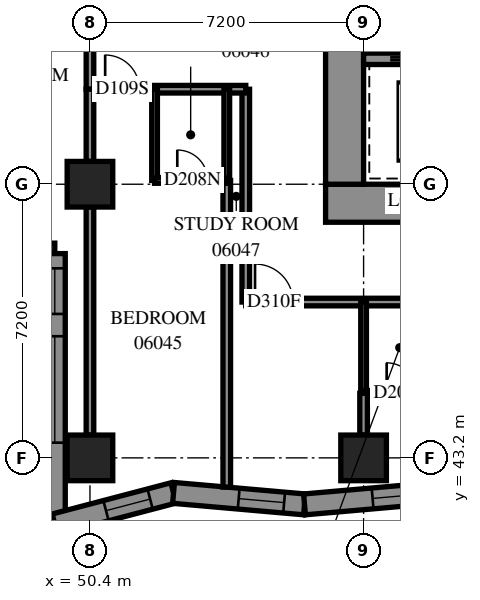
"""IFC4 building model, lengths in metres.
Left out: names, types, materials, properties, quantities, classifications, styles, units other than length and angle.
Written with IfcOpenShell. Run it as: python <this file> out.ifc"""

import sys

from ifc_helpers import new_model, si_unit, direction, frame, frame_2d, origin, origin_2d, place, context, subcontext, project, spatial, polyline, rectangle, outline, extrude, element, fill, save


model = new_model("IFC4")
c1 = context("Model", 3, precision=1e-05, world=origin(), true_north=direction((0.0, 1.0)))
c2 = subcontext(c1, "Body", "Model", "MODEL_VIEW")
j1 = project(units=[si_unit("LENGTHUNIT", "METRE"), si_unit("PLANEANGLEUNIT", "RADIAN")], contexts=[c1])
p1 = place(None, origin())
s1 = spatial("IfcSite", under=j1, at=p1, CompositionType="ELEMENT")
p2 = place(p1, origin())
s2 = spatial("IfcBuilding", under=s1, at=p2, CompositionType="ELEMENT")
p3 = place(p2, frame((0.0, 0.0, 27.0)))
s3 = spatial("IfcBuildingStorey", under=s2, at=p3, CompositionType="ELEMENT", Elevation=27.0)
for number, where, z_axis, x_axis in (
    (1, (50.4, 43.2, 0.0), (0.0, 0.0, 1.0), (1.0, 0.0, 0.0)),
    (2, (50.4, 50.4, 0.0), (0.0, 0.0, 1.0), (1.0, 0.0, 0.0)),
    (3, (57.6, 43.2, 0.0), (0.0, 0.0, 1.0), (1.0, 0.0, 0.0)),
):
    element("IfcColumn", number, at=place(p3, frame(where, z_axis=z_axis, x_axis=x_axis)), inside=s3, PredefinedType="COLUMN", context=c2, shape_type="SweptSolid", body=[
        extrude(rectangle(XDim=1.2, YDim=1.2, at=origin_2d()), origin(), (0.0, 0.0, 1.0), 3.1),
    ])
p4 = place(p3, frame((56.6, 49.9, -0.3), z_axis=(0.0, 0.0, 1.0), x_axis=(1.0, 0.0, 0.0)))
e4 = element("IfcWall", 4, at=p4, inside=s3, PredefinedType="SHEAR", context=c2, shape_type="SweptSolid", body=[
    extrude(rectangle(XDim=16.4, YDim=1.0, at=frame_2d((8.2, 0.0))), origin(), (0.0, 0.0, 1.0), 2.7),
])
p5 = place(p3, frame((57.1, 50.4, -0.3), z_axis=(0.0, 0.0, 1.0), x_axis=(0.0, 1.0, 0.0)))
e5 = element("IfcWall", 5, at=p5, inside=s3, PredefinedType="SHEAR", context=c2, shape_type="SweptSolid", body=[
    extrude(rectangle(XDim=14.4, YDim=1.0, at=frame_2d((7.2, 0.0))), origin(), (0.0, 0.0, 1.0), 2.7),
])
p6 = place(p5, frame((4.55, 0.0, 0.3)))
e6 = element("IfcOpeningElement", 6, at=p6, cuts=e5, PredefinedType="OPENING", context=c2, shape_type="SweptSolid", body=[
    extrude(rectangle(XDim=1.1, YDim=2.1, at=frame_2d((0.55, 1.05))), frame((0.0, 0.51, 0.0), z_axis=(0.0, -1.0, 0.0), x_axis=(1.0, 0.0, 0.0)), (0.0, 0.0, 1.0), 1.02),
])
p7 = place(p5, frame((11.35, 0.0, 0.3)))
e7 = element("IfcOpeningElement", 7, at=p7, cuts=e5, PredefinedType="OPENING", context=c2, shape_type="SweptSolid", body=[
    extrude(rectangle(XDim=1.1, YDim=2.1, at=frame_2d((0.55, 1.05))), frame((0.0, 0.51, 0.0), z_axis=(0.0, -1.0, 0.0), x_axis=(1.0, 0.0, 0.0)), (0.0, 0.0, 1.0), 1.02),
])
p8 = place(p3, frame((57.6, 53.7, 0.0), z_axis=(0.0, 0.0, 1.0), x_axis=(1.0, 0.0, 0.0)))
e8 = element("IfcWall", 8, at=p8, inside=s3, PredefinedType="SOLIDWALL", context=c2, shape_type="SweptSolid", body=[
    extrude(rectangle(XDim=14.4, YDim=0.3, at=frame_2d((7.2, 0.0))), origin(), (0.0, 0.0, 1.0), 3.1),
])
p9 = place(p8, frame((1.25, 0.0, 0.0)))
e9 = element("IfcOpeningElement", 9, at=p9, cuts=e8, PredefinedType="OPENING", context=c2, shape_type="SweptSolid", body=[
    extrude(rectangle(XDim=1.1, YDim=2.1, at=frame_2d((0.55, 1.05))), frame((0.0, 0.16, 0.0), z_axis=(0.0, -1.0, 0.0), x_axis=(1.0, 0.0, 0.0)), (0.0, 0.0, 1.0), 0.32),
])
p10 = place(p8, frame((4.85, 0.0, 0.0)))
e10 = element("IfcOpeningElement", 10, at=p10, cuts=e8, PredefinedType="OPENING", context=c2, shape_type="SweptSolid", body=[
    extrude(rectangle(XDim=1.1, YDim=2.1, at=frame_2d((0.55, 1.05))), frame((0.0, 0.16, 0.0), z_axis=(0.0, -1.0, 0.0), x_axis=(1.0, 0.0, 0.0)), (0.0, 0.0, 1.0), 0.32),
])
p11 = place(p8, frame((8.45, 0.0, 0.0)))
e11 = element("IfcOpeningElement", 11, at=p11, cuts=e8, PredefinedType="OPENING", context=c2, shape_type="SweptSolid", body=[
    extrude(rectangle(XDim=1.1, YDim=2.1, at=frame_2d((0.55, 1.05))), frame((0.0, 0.16, 0.0), z_axis=(0.0, -1.0, 0.0), x_axis=(1.0, 0.0, 0.0)), (0.0, 0.0, 1.0), 0.32),
])
p12 = place(p8, frame((12.05, 0.0, 0.0)))
e12 = element("IfcOpeningElement", 12, at=p12, cuts=e8, PredefinedType="OPENING", context=c2, shape_type="SweptSolid", body=[
    extrude(rectangle(XDim=1.1, YDim=2.1, at=frame_2d((0.55, 1.05))), frame((0.0, 0.16, 0.0), z_axis=(0.0, -1.0, 0.0), x_axis=(1.0, 0.0, 0.0)), (0.0, 0.0, 1.0), 0.32),
])
p13 = place(p3, frame((35.075, 48.575, 0.0), z_axis=(0.0, 0.0, 1.0), x_axis=(1.0, 0.0, 0.0)))
e13 = element("IfcWall", 13, at=p13, inside=s3, PredefinedType="SOLIDWALL", context=c2, shape_type="SweptSolid", body=[
    extrude(outline(polyline([(-0.275, -0.275), (14.125, -0.275), (14.675, 0.275), (0.275, 0.275), (-0.275, -0.275)])), origin(), (0.0, 0.0, 1.0), 3.1),
])
p14 = place(p13, frame((1.325, 0.0, 0.5)))
e14 = element("IfcOpeningElement", 14, at=p14, cuts=e13, PredefinedType="OPENING", context=c2, shape_type="SweptSolid", body=[
    extrude(rectangle(XDim=2.8, YDim=2.45, at=frame_2d((1.4, 1.225))), frame((0.0, 0.285, 0.0), z_axis=(0.0, -1.0, 0.0), x_axis=(1.0, 0.0, 0.0)), (0.0, 0.0, 1.0), 0.57),
])
p15 = place(p13, frame((4.925, 0.0, 0.5)))
e15 = element("IfcOpeningElement", 15, at=p15, cuts=e13, PredefinedType="OPENING", context=c2, shape_type="SweptSolid", body=[
    extrude(rectangle(XDim=2.8, YDim=2.45, at=frame_2d((1.4, 1.225))), frame((0.0, 0.285, 0.0), z_axis=(0.0, -1.0, 0.0), x_axis=(1.0, 0.0, 0.0)), (0.0, 0.0, 1.0), 0.57),
])
p16 = place(p13, frame((8.275, 0.0, 0.5)))
e16 = element("IfcOpeningElement", 16, at=p16, cuts=e13, PredefinedType="OPENING", context=c2, shape_type="SweptSolid", body=[
    extrude(rectangle(XDim=2.8, YDim=2.45, at=frame_2d((1.4, 1.225))), frame((0.0, 0.285, 0.0), z_axis=(0.0, -1.0, 0.0), x_axis=(1.0, 0.0, 0.0)), (0.0, 0.0, 1.0), 0.57),
])
p17 = place(p13, frame((12.363, 0.0, 0.5)))
e17 = element("IfcOpeningElement", 17, at=p17, cuts=e13, PredefinedType="OPENING", context=c2, shape_type="SweptSolid", body=[
    extrude(rectangle(XDim=1.2, YDim=2.45, at=frame_2d((0.6, 1.225))), frame((0.0, 0.285, 0.0), z_axis=(0.0, -1.0, 0.0), x_axis=(1.0, 0.0, 0.0)), (0.0, 0.0, 1.0), 0.57),
])
p18 = place(p3, frame((49.475, 48.575, 0.0), z_axis=(0.0, 0.0, 1.0), x_axis=(0.0, -1.0, 0.0)))
e18 = element("IfcWall", 18, at=p18, inside=s3, PredefinedType="SOLIDWALL", context=c2, shape_type="SweptSolid", body=[
    extrude(outline(polyline([(0.275, -0.275), (7.475, -0.275), (6.762, 0.275), (-0.275, 0.275), (0.275, -0.275)])), origin(), (0.0, 0.0, 1.0), 3.1),
])
p19 = place(p18, frame((2.175, 0.0, 0.5)))
e19 = element("IfcOpeningElement", 19, at=p19, cuts=e18, PredefinedType="OPENING", context=c2, shape_type="SweptSolid", body=[
    extrude(rectangle(XDim=2.8, YDim=2.45, at=frame_2d((1.4, 1.225))), frame((0.0, 0.285, 0.0), z_axis=(0.0, -1.0, 0.0), x_axis=(1.0, 0.0, 0.0)), (0.0, 0.0, 1.0), 0.57),
])
p20 = place(p18, frame((0.388, 0.0, 0.5)))
e20 = element("IfcOpeningElement", 20, at=p20, cuts=e18, PredefinedType="OPENING", context=c2, shape_type="SweptSolid", body=[
    extrude(rectangle(XDim=1.2, YDim=2.45, at=frame_2d((0.6, 1.225))), frame((0.0, 0.285, 0.0), z_axis=(0.0, -1.0, 0.0), x_axis=(1.0, 0.0, 0.0)), (0.0, 0.0, 1.0), 0.57),
])
p21 = place(p3, frame((49.475, 41.457, 0.0), z_axis=(0.0, 0.0, 1.0), x_axis=(0.9671322544, 0.2542738729, 0.0)))
e21 = element("IfcWall", 21, at=p21, inside=s3, PredefinedType="SOLIDWALL", context=c2, shape_type="SweptSolid", body=[
    extrude(outline(polyline([(-0.357, -0.275), (3.183, -0.275), (3.278, 0.275), (0.357, 0.275), (-0.357, -0.275)])), origin(), (0.0, 0.0, 1.0), 3.1),
])
p22 = place(p21, frame((1.393, 0.0, 0.5)))
e22 = element("IfcOpeningElement", 22, at=p22, cuts=e21, PredefinedType="OPENING", context=c2, shape_type="SweptSolid", body=[
    extrude(rectangle(XDim=1.2, YDim=2.45, at=frame_2d((0.6, 1.225))), frame((0.0, 0.285, 0.0), z_axis=(0.0, -1.0, 0.0), x_axis=(1.0, 0.0, 0.0)), (0.0, 0.0, 1.0), 0.57),
])
p23 = place(p3, frame((52.599, 42.278, 0.0), z_axis=(0.0, 0.0, 1.0), x_axis=(0.9961831061, -0.0872881385, 0.0)))
e23 = element("IfcWall", 23, at=p23, inside=s3, PredefinedType="SOLIDWALL", context=c2, shape_type="SweptSolid", body=[
    extrude(outline(polyline([(0.048, -0.275), (3.484, -0.275), (3.436, 0.275), (-0.048, 0.275), (0.048, -0.275)])), origin(), (0.0, 0.0, 1.0), 3.1),
])
p24 = place(p23, frame((1.721, 0.0, 0.5)))
e24 = element("IfcOpeningElement", 24, at=p24, cuts=e23, PredefinedType="OPENING", context=c2, shape_type="SweptSolid", body=[
    extrude(rectangle(XDim=1.2, YDim=2.45, at=frame_2d((0.6, 1.225))), frame((0.0, 0.285, 0.0), z_axis=(0.0, -1.0, 0.0), x_axis=(1.0, 0.0, 0.0)), (0.0, 0.0, 1.0), 0.57),
])
p25 = place(p3, frame((56.046, 41.976, 0.0), z_axis=(0.0, 0.0, 1.0), x_axis=(0.996181166, 0.0873102778, 0.0)))
e25 = element("IfcWall", 25, at=p25, inside=s3, PredefinedType="SOLIDWALL", context=c2, shape_type="SweptSolid", body=[
    extrude(outline(polyline([(-0.024, -0.275), (3.412, -0.275), (3.46, 0.275), (0.024, 0.275), (-0.024, -0.275)])), origin(), (0.0, 0.0, 1.0), 3.1),
])
p26 = place(p25, frame((1.798, 0.0, 0.5)))
e26 = element("IfcOpeningElement", 26, at=p26, cuts=e25, PredefinedType="OPENING", context=c2, shape_type="SweptSolid", body=[
    extrude(rectangle(XDim=1.2, YDim=2.45, at=frame_2d((0.6, 1.225))), frame((0.0, 0.285, 0.0), z_axis=(0.0, -1.0, 0.0), x_axis=(1.0, 0.0, 0.0)), (0.0, 0.0, 1.0), 0.57),
])
p27 = place(p3, frame((54.5, 47.3, 0.0), z_axis=(0.0, 0.0, 1.0), x_axis=(1.0, 0.0, 0.0)))
e27 = element("IfcWall", 27, at=p27, inside=s3, PredefinedType="PARTITIONING", context=c2, shape_type="SweptSolid", body=[
    extrude(rectangle(XDim=19.56, YDim=0.2, at=frame_2d((9.78, 0.0))), origin(), (0.0, 0.0, 1.0), 3.1),
])
p28 = place(p27, frame((0.243, 0.0, 0.0)))
e28 = element("IfcOpeningElement", 28, at=p28, cuts=e27, PredefinedType="OPENING", context=c2, shape_type="SweptSolid", body=[
    extrude(rectangle(XDim=1.0, YDim=2.1, at=frame_2d((0.5, 1.05))), frame((0.0, 0.11, 0.0), z_axis=(0.0, -1.0, 0.0), x_axis=(1.0, 0.0, 0.0)), (0.0, 0.0, 1.0), 0.22),
])
p29 = place(p27, frame((5.4, 0.0, 0.0)))
e29 = element("IfcOpeningElement", 29, at=p29, cuts=e27, PredefinedType="OPENING", context=c2, shape_type="SweptSolid", body=[
    extrude(rectangle(XDim=0.9, YDim=2.1, at=frame_2d((0.45, 1.05))), frame((0.0, 0.11, 0.0), z_axis=(0.0, -1.0, 0.0), x_axis=(1.0, 0.0, 0.0)), (0.0, 0.0, 1.0), 0.22),
])
p30 = place(p27, frame((7.1, 0.0, 0.0)))
e30 = element("IfcOpeningElement", 30, at=p30, cuts=e27, PredefinedType="OPENING", context=c2, shape_type="SweptSolid", body=[
    extrude(rectangle(XDim=0.9, YDim=2.1, at=frame_2d((0.45, 1.05))), frame((0.0, 0.11, 0.0), z_axis=(0.0, -1.0, 0.0), x_axis=(1.0, 0.0, 0.0)), (0.0, 0.0, 1.0), 0.22),
])
p31 = place(p27, frame((12.6, 0.0, 0.0)))
e31 = element("IfcOpeningElement", 31, at=p31, cuts=e27, PredefinedType="OPENING", context=c2, shape_type="SweptSolid", body=[
    extrude(rectangle(XDim=0.9, YDim=2.1, at=frame_2d((0.45, 1.05))), frame((0.0, 0.11, 0.0), z_axis=(0.0, -1.0, 0.0), x_axis=(1.0, 0.0, 0.0)), (0.0, 0.0, 1.0), 0.22),
])
p32 = place(p27, frame((14.3, 0.0, 0.0)))
e32 = element("IfcOpeningElement", 32, at=p32, cuts=e27, PredefinedType="OPENING", context=c2, shape_type="SweptSolid", body=[
    extrude(rectangle(XDim=0.9, YDim=2.1, at=frame_2d((0.45, 1.05))), frame((0.0, 0.11, 0.0), z_axis=(0.0, -1.0, 0.0), x_axis=(1.0, 0.0, 0.0)), (0.0, 0.0, 1.0), 0.22),
])
p33 = place(p3, frame((54.0, 42.431, 0.0), z_axis=(0.0, 0.0, 1.0), x_axis=(0.0, 1.0, 0.0)))
e33 = element("IfcWall", 33, at=p33, inside=s3, PredefinedType="PARTITIONING", context=c2, shape_type="SweptSolid", body=[
    extrude(rectangle(XDim=8.069, YDim=0.2, at=frame_2d((4.034, 0.0))), origin(), (0.0, 0.0, 1.0), 3.1),
])
p34 = place(p3, frame((50.4, 43.8, 0.0), z_axis=(0.0, 0.0, 1.0), x_axis=(0.0, 1.0, 0.0)))
e34 = element("IfcWall", 34, at=p34, inside=s3, PredefinedType="PARTITIONING", context=c2, shape_type="SweptSolid", body=[
    extrude(rectangle(XDim=6.0, YDim=0.2, at=frame_2d((3.0, 0.0))), origin(), (0.0, 0.0, 1.0), 2.6),
])
p35 = place(p3, frame((54.5, 47.3, 0.0), z_axis=(0.0, 0.0, 1.0), x_axis=(0.0, 1.0, 0.0)))
e35 = element("IfcWall", 35, at=p35, inside=s3, PredefinedType="PARTITIONING", context=c2, shape_type="SweptSolid", body=[
    extrude(rectangle(XDim=5.6, YDim=0.2, at=frame_2d((2.8, 0.0))), origin(), (0.0, 0.0, 1.0), 3.1),
])
p36 = place(p3, frame((50.4, 52.9, 0.0), z_axis=(0.0, 0.0, 1.0), x_axis=(1.0, 0.0, 0.0)))
e36 = element("IfcWall", 36, at=p36, inside=s3, PredefinedType="PARTITIONING", context=c2, shape_type="SweptSolid", body=[
    extrude(rectangle(XDim=4.1, YDim=0.2, at=frame_2d((2.05, 0.0))), origin(), (0.0, 0.0, 1.0), 3.1),
])
p37 = place(p36, frame((0.4, 0.0, 0.0)))
e37 = element("IfcOpeningElement", 37, at=p37, cuts=e36, PredefinedType="OPENING", context=c2, shape_type="SweptSolid", body=[
    extrude(rectangle(XDim=0.9, YDim=2.1, at=frame_2d((0.45, 1.05))), frame((0.0, 0.11, 0.0), z_axis=(0.0, -1.0, 0.0), x_axis=(1.0, 0.0, 0.0)), (0.0, 0.0, 1.0), 0.22),
])
for number, where, z_axis, x_axis in (
    (38, (52.1, 50.5, 0.0), (0.0, 0.0, 1.0), (0.0, 1.0, 0.0)),
    (39, (54.0, 50.5, 0.0), (0.0, 0.0, 1.0), (0.0, 1.0, 0.0)),
    (40, (57.6, 44.9, 0.0), (0.0, 0.0, 1.0), (0.0, 1.0, 0.0)),
):
    element("IfcWall", number, at=place(p3, frame(where, z_axis=z_axis, x_axis=x_axis)), inside=s3, PredefinedType="PARTITIONING", context=c2, shape_type="SweptSolid", body=[
        extrude(rectangle(XDim=2.4, YDim=0.15, at=frame_2d((1.2, 0.0))), origin(), (0.0, 0.0, 1.0), 3.1),
    ])
p38 = place(p3, frame((50.4, 52.9, 0.0), z_axis=(0.0, 0.0, 1.0), x_axis=(0.0, 1.0, 0.0)))
e41 = element("IfcWall", 41, at=p38, inside=s3, PredefinedType="PARTITIONING", context=c2, shape_type="SweptSolid", body=[
    extrude(rectangle(XDim=2.2, YDim=0.2, at=frame_2d((1.1, 0.0))), origin(), (0.0, 0.0, 1.0), 3.1),
])
p39 = place(p3, frame((50.4, 51.0, 0.0), z_axis=(0.0, 0.0, 1.0), x_axis=(0.0, 1.0, 0.0)))
e42 = element("IfcWall", 42, at=p39, inside=s3, PredefinedType="PARTITIONING", context=c2, shape_type="SweptSolid", body=[
    extrude(rectangle(XDim=1.9, YDim=0.2, at=frame_2d((0.95, 0.0))), origin(), (0.0, 0.0, 1.0), 3.1),
])
p40 = place(p3, frame((52.1, 50.5, 0.0), z_axis=(0.0, 0.0, 1.0), x_axis=(1.0, 0.0, 0.0)))
e43 = element("IfcWall", 43, at=p40, inside=s3, PredefinedType="PARTITIONING", context=c2, shape_type="SweptSolid", body=[
    extrude(rectangle(XDim=1.9, YDim=0.15, at=frame_2d((0.95, 0.0))), origin(), (0.0, 0.0, 1.0), 3.1),
])
p41 = place(p40, frame((0.598, 0.0, 0.0)))
e44 = element("IfcOpeningElement", 44, at=p41, cuts=e43, PredefinedType="OPENING", context=c2, shape_type="SweptSolid", body=[
    extrude(rectangle(XDim=0.8, YDim=2.1, at=frame_2d((0.4, 1.05))), frame((0.0, 0.085, 0.0), z_axis=(0.0, -1.0, 0.0), x_axis=(1.0, 0.0, 0.0)), (0.0, 0.0, 1.0), 0.17),
])
p42 = place(p3, frame((57.6, 44.9, 0.0), z_axis=(0.0, 0.0, 1.0), x_axis=(1.0, 0.0, 0.0)))
e45 = element("IfcWall", 45, at=p42, inside=s3, PredefinedType="PARTITIONING", context=c2, shape_type="SweptSolid", body=[
    extrude(rectangle(XDim=1.9, YDim=0.15, at=frame_2d((0.95, 0.0))), origin(), (0.0, 0.0, 1.0), 3.1),
])
p43 = place(p42, frame((0.607, 0.0, 0.0)))
e46 = element("IfcOpeningElement", 46, at=p43, cuts=e45, PredefinedType="OPENING", context=c2, shape_type="SweptSolid", body=[
    extrude(rectangle(XDim=0.8, YDim=2.1, at=frame_2d((0.4, 1.05))), frame((0.0, 0.085, 0.0), z_axis=(0.0, -1.0, 0.0), x_axis=(1.0, 0.0, 0.0)), (0.0, 0.0, 1.0), 0.17),
])
p44 = place(p3, frame((57.6, 43.8, 0.0), z_axis=(0.0, 0.0, 1.0), x_axis=(0.0, 1.0, 0.0)))
e47 = element("IfcWall", 47, at=p44, inside=s3, PredefinedType="PARTITIONING", context=c2, shape_type="SweptSolid", body=[
    extrude(rectangle(XDim=1.1, YDim=0.2, at=frame_2d((0.55, 0.0))), origin(), (0.0, 0.0, 1.0), 3.1),
])
p45 = place(p19, origin())
e48 = element("IfcWindow", 48, at=p45, inside=s3, PartitioningType="SINGLE_PANEL", PredefinedType="WINDOW", context=c2, shape_type="SweptSolid", body=[
    extrude(rectangle(XDim=2.8, YDim=2.45, at=frame_2d((1.4, 1.225))), frame((0.0, 0.155, 0.0), z_axis=(0.0, -1.0, 0.0), x_axis=(1.0, 0.0, 0.0)), (0.0, 0.0, 1.0), 0.06),
])
fill(e19, e48)
p46 = place(p20, origin())
e49 = element("IfcWindow", 49, at=p46, inside=s3, PartitioningType="SINGLE_PANEL", PredefinedType="WINDOW", context=c2, shape_type="SweptSolid", body=[
    extrude(rectangle(XDim=1.2, YDim=2.45, at=frame_2d((0.6, 1.225))), frame((0.0, 0.155, 0.0), z_axis=(0.0, -1.0, 0.0), x_axis=(1.0, 0.0, 0.0)), (0.0, 0.0, 1.0), 0.06),
])
fill(e20, e49)
p47 = place(p22, origin())
e50 = element("IfcWindow", 50, at=p47, inside=s3, PartitioningType="SINGLE_PANEL", PredefinedType="WINDOW", context=c2, shape_type="SweptSolid", body=[
    extrude(rectangle(XDim=1.2, YDim=2.45, at=frame_2d((0.6, 1.225))), frame((0.0, 0.155, 0.0), z_axis=(0.0, -1.0, 0.0), x_axis=(1.0, 0.0, 0.0)), (0.0, 0.0, 1.0), 0.06),
])
fill(e22, e50)
p48 = place(p24, origin())
e51 = element("IfcWindow", 51, at=p48, inside=s3, PartitioningType="SINGLE_PANEL", PredefinedType="WINDOW", context=c2, shape_type="SweptSolid", body=[
    extrude(rectangle(XDim=1.2, YDim=2.45, at=frame_2d((0.6, 1.225))), frame((0.0, 0.155, 0.0), z_axis=(0.0, -1.0, 0.0), x_axis=(1.0, 0.0, 0.0)), (0.0, 0.0, 1.0), 0.06),
])
fill(e24, e51)
p49 = place(p26, origin())
e52 = element("IfcWindow", 52, at=p49, inside=s3, PartitioningType="SINGLE_PANEL", PredefinedType="WINDOW", context=c2, shape_type="SweptSolid", body=[
    extrude(rectangle(XDim=1.2, YDim=2.45, at=frame_2d((0.6, 1.225))), frame((0.0, 0.155, 0.0), z_axis=(0.0, -1.0, 0.0), x_axis=(1.0, 0.0, 0.0)), (0.0, 0.0, 1.0), 0.06),
])
fill(e26, e52)
p50 = place(p37, origin())
e53 = element("IfcDoor", 53, at=p50, inside=s3, OperationType="SINGLE_SWING_LEFT", PredefinedType="DOOR", context=c2, shape_type="SweptSolid", body=[
    extrude(rectangle(XDim=0.9, YDim=2.1, at=frame_2d((0.45, 1.05))), frame((0.0, 0.025, 0.0), z_axis=(0.0, -1.0, 0.0), x_axis=(1.0, 0.0, 0.0)), (0.0, 0.0, 1.0), 0.05),
])
fill(e37, e53)
p51 = place(p41, origin())
e54 = element("IfcDoor", 54, at=p51, inside=s3, OperationType="SINGLE_SWING_RIGHT", PredefinedType="DOOR", context=c2, shape_type="SweptSolid", body=[
    extrude(rectangle(XDim=0.8, YDim=2.1, at=frame_2d((0.4, 1.05))), frame((0.0, 0.025, 0.0), z_axis=(0.0, -1.0, 0.0), x_axis=(1.0, 0.0, 0.0)), (0.0, 0.0, 1.0), 0.05),
])
fill(e44, e54)
p52 = place(p28, origin())
e55 = element("IfcDoor", 55, at=p52, inside=s3, OperationType="SINGLE_SWING_RIGHT", PredefinedType="DOOR", context=c2, shape_type="SweptSolid", body=[
    extrude(rectangle(XDim=1.0, YDim=2.1, at=frame_2d((0.5, 1.05))), frame((0.0, 0.025, 0.0), z_axis=(0.0, -1.0, 0.0), x_axis=(1.0, 0.0, 0.0)), (0.0, 0.0, 1.0), 0.05),
])
fill(e28, e55)
p53 = place(p43, origin())
e56 = element("IfcDoor", 56, at=p53, inside=s3, OperationType="SINGLE_SWING_RIGHT", PredefinedType="DOOR", context=c2, shape_type="SweptSolid", body=[
    extrude(rectangle(XDim=0.8, YDim=2.1, at=frame_2d((0.4, 1.05))), frame((0.0, 0.025, 0.0), z_axis=(0.0, -1.0, 0.0), x_axis=(1.0, 0.0, 0.0)), (0.0, 0.0, 1.0), 0.05),
])
fill(e46, e56)
save(model, sys.argv[1])
